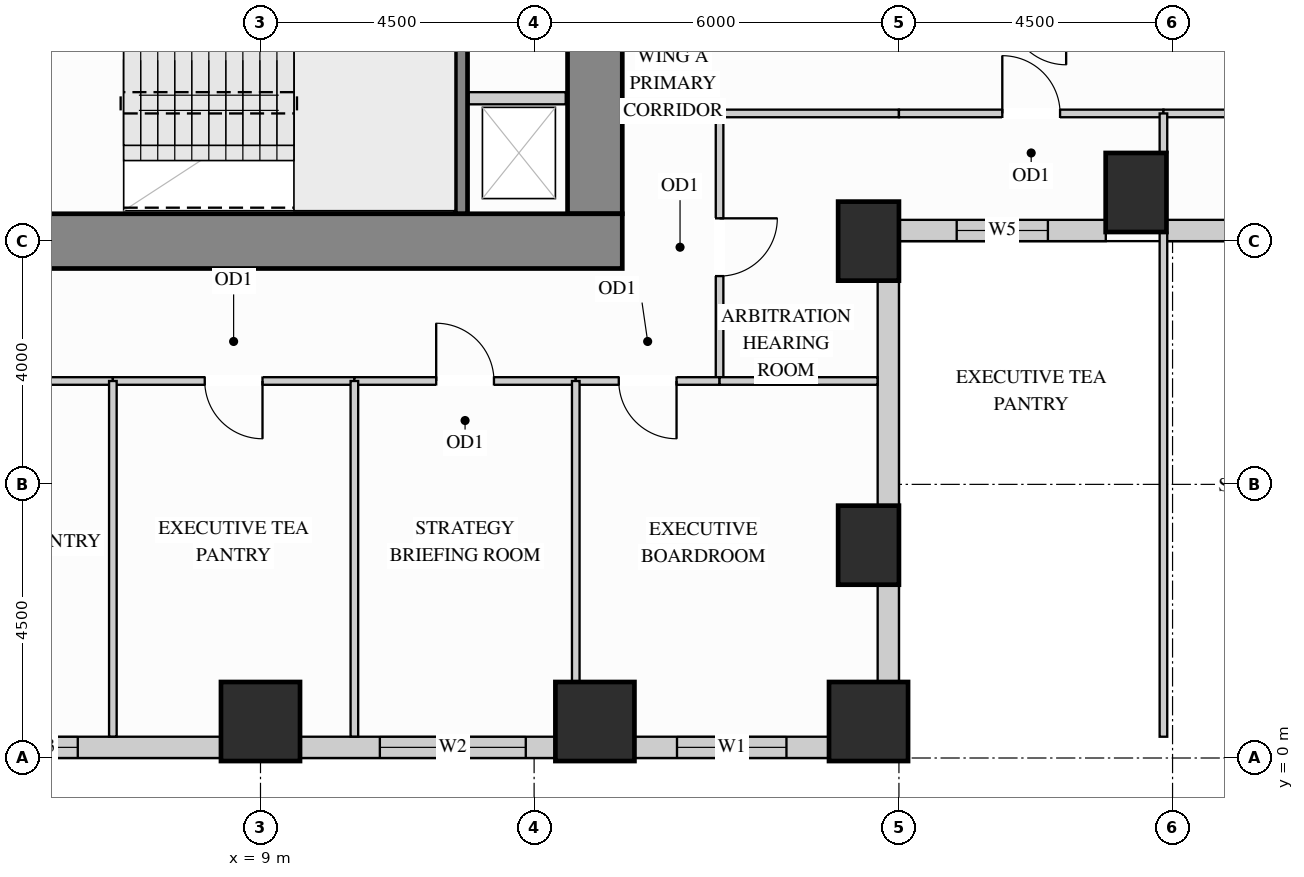
"""IFC4 building model, lengths in metres.
Left out: names, types, materials, properties, quantities, classifications, styles, units other than length and angle.
Written with IfcOpenShell. Run it as: python <this file> out.ifc"""

import sys

from ifc_helpers import new_model, si_unit, direction, frame, frame_2d, origin, origin_2d, place, context, subcontext, project, spatial, rectangle, extrude, source, transform, mapped, element, fill, save


model = new_model("IFC4")
c1 = context("Model", 3, precision=1e-05, world=origin(), true_north=direction((0.0, 1.0)))
c2 = subcontext(c1, "Body", "Model", "MODEL_VIEW")
j1 = project(units=[si_unit("LENGTHUNIT", "METRE"), si_unit("PLANEANGLEUNIT", "RADIAN")], contexts=[c1])
p1 = place(None, origin())
s1 = spatial("IfcSite", under=j1, at=p1, CompositionType="ELEMENT")
p2 = place(p1, origin())
s2 = spatial("IfcBuilding", under=s1, at=p2, CompositionType="ELEMENT")
p3 = place(p2, frame((0.0, 0.0, 29.7)))
s3 = spatial("IfcBuildingStorey", under=s2, at=p3, CompositionType="ELEMENT", Elevation=29.7)
m1 = source(origin(), c2, "Body", "SweptSolid", [
    extrude(rectangle(XDim=1.0, YDim=1.3, at=origin_2d()), origin(), (0.0, 0.0, 1.0), 3.38),
])
for number, where, z_axis, x_axis in (
    (1, (19.0, 3.5, 0.0), (0.0, 0.0, 1.0), (1.0, 0.0, 0.0)),
    (2, (19.0, 8.5, 0.0), (0.0, 0.0, 1.0), (1.0, 0.0, 0.0)),
    (3, (23.4, 9.3, 0.0), (0.0, 0.0, 1.0), (1.0, 0.0, 0.0)),
):
    element("IfcColumn", number, at=place(p3, frame(where, z_axis=z_axis, x_axis=x_axis)), inside=s3, PredefinedType="COLUMN", context=c2, shape_type="MappedRepresentation", body=[
        mapped(m1, transform((0.0, 0.0, 0.0), x_axis=(1.0, 0.0, 0.0), y_axis=(0.0, 1.0, 0.0), z_axis=(0.0, 0.0, 1.0))),
    ])
m2 = source(origin(), c2, "Body", "SweptSolid", [
    extrude(rectangle(XDim=1.3, YDim=1.3, at=origin_2d()), origin(), (0.0, 0.0, 1.0), 3.38),
])
for number, where, z_axis, x_axis in (
    (4, (14.5, 0.6, 0.0), (0.0, 0.0, 1.0), (1.0, 0.0, 0.0)),
    (5, (19.0, 0.6, 0.0), (0.0, 0.0, 1.0), (1.0, 0.0, 0.0)),
    (6, (9.0, 0.6, 0.0), (0.0, 0.0, 1.0), (1.0, 0.0, 0.0)),
):
    element("IfcColumn", number, at=place(p3, frame(where, z_axis=z_axis, x_axis=x_axis)), inside=s3, PredefinedType="COLUMN", context=c2, shape_type="MappedRepresentation", body=[
        mapped(m2, transform((0.0, 0.0, 0.0), x_axis=(1.0, 0.0, 0.0), y_axis=(0.0, 1.0, 0.0), z_axis=(0.0, 0.0, 1.0))),
    ])
m3 = source(origin(), c2, "Body", "SweptSolid", [
    extrude(rectangle(XDim=9.87, YDim=0.9, at=frame_2d((4.935, 0.0))), origin(), (0.0, 0.0, 1.0), 3.38),
])
p4 = place(p3, frame((14.5, 8.95, 0.0), z_axis=(0.0, 0.0, 1.0), x_axis=(0.0, 1.0, 0.0)))
e7 = element("IfcWall", 7, at=p4, inside=s3, PredefinedType="SHEAR", context=c2, shape_type="MappedRepresentation", body=[
    mapped(m3, transform((0.0, 0.0, 0.0), x_axis=(1.0, 0.0, 0.0), y_axis=(0.0, 1.0, 0.0), z_axis=(0.0, 0.0, 1.0))),
])
m4 = source(origin(), c2, "Body", "SweptSolid", [
    extrude(rectangle(XDim=10.9, YDim=0.9, at=frame_2d((5.45, 0.0))), origin(), (0.0, 0.0, 1.0), 3.38),
])
p5 = place(p3, frame((4.05, 8.5, 0.0), z_axis=(0.0, 0.0, 1.0), x_axis=(1.0, 0.0, 0.0)))
e8 = element("IfcWall", 8, at=p5, inside=s3, PredefinedType="SHEAR", context=c2, shape_type="MappedRepresentation", body=[
    mapped(m4, transform((0.0, 0.0, 0.0), x_axis=(1.0, 0.0, 0.0), y_axis=(0.0, 1.0, 0.0), z_axis=(0.0, 0.0, 1.0))),
])
p6 = place(p3, frame((4.148, 0.175, 0.0), z_axis=(0.0, 0.0, 1.0), x_axis=(1.0, 0.0, 0.0)))
e9 = element("IfcWall", 9, at=p6, inside=s3, PredefinedType="SOLIDWALL", context=c2, shape_type="SweptSolid", body=[
    extrude(rectangle(XDim=4.204, YDim=0.35, at=frame_2d((2.102, 0.0))), origin(), (0.0, 0.0, 1.0), 2.51),
])
p7 = place(p6, frame((0.647, 0.0, 0.78)))
e10 = element("IfcOpeningElement", 10, at=p7, cuts=e9, PredefinedType="OPENING", context=c2, shape_type="SweptSolid", body=[
    extrude(rectangle(XDim=1.2, YDim=1.55, at=frame_2d((0.6, 0.775))), frame((0.0, 0.185, 0.0), z_axis=(0.0, -1.0, 0.0), x_axis=(1.0, 0.0, 0.0)), (0.0, 0.0, 1.0), 0.37),
])
p8 = place(p3, frame((9.648, 0.175, 0.0), z_axis=(0.0, 0.0, 1.0), x_axis=(1.0, 0.0, 0.0)))
e11 = element("IfcWall", 11, at=p8, inside=s3, PredefinedType="SOLIDWALL", context=c2, shape_type="SweptSolid", body=[
    extrude(rectangle(XDim=4.204, YDim=0.35, at=frame_2d((2.102, 0.0))), origin(), (0.0, 0.0, 1.0), 2.51),
])
p9 = place(p8, frame((1.315, 0.0, 0.78)))
e12 = element("IfcOpeningElement", 12, at=p9, cuts=e11, PredefinedType="OPENING", context=c2, shape_type="SweptSolid", body=[
    extrude(rectangle(XDim=2.4, YDim=1.55, at=frame_2d((1.2, 0.775))), frame((0.0, 0.185, 0.0), z_axis=(0.0, -1.0, 0.0), x_axis=(1.0, 0.0, 0.0)), (0.0, 0.0, 1.0), 0.37),
])
p10 = place(p3, frame((15.148, 0.175, 0.0), z_axis=(0.0, 0.0, 1.0), x_axis=(1.0, 0.0, 0.0)))
e13 = element("IfcWall", 13, at=p10, inside=s3, PredefinedType="SOLIDWALL", context=c2, shape_type="SweptSolid", body=[
    extrude(rectangle(XDim=3.204, YDim=0.35, at=frame_2d((1.602, 0.0))), origin(), (0.0, 0.0, 1.0), 2.51),
])
p11 = place(p10, frame((0.702, 0.0, 0.78)))
e14 = element("IfcOpeningElement", 14, at=p11, cuts=e13, PredefinedType="OPENING", context=c2, shape_type="SweptSolid", body=[
    extrude(rectangle(XDim=1.8, YDim=1.55, at=frame_2d((0.9, 0.775))), frame((0.0, 0.185, 0.0), z_axis=(0.0, -1.0, 0.0), x_axis=(1.0, 0.0, 0.0)), (0.0, 0.0, 1.0), 0.37),
])
m5 = source(origin(), c2, "Body", "SweptSolid", [
    extrude(rectangle(XDim=1.604, YDim=0.35, at=frame_2d((0.802, 0.0))), origin(), (0.0, 0.0, 1.0), 2.51),
])
p12 = place(p3, frame((19.325, 1.248, 0.0), z_axis=(0.0, 0.0, 1.0), x_axis=(0.0, 1.0, 0.0)))
e15 = element("IfcWall", 15, at=p12, inside=s3, PredefinedType="SOLIDWALL", context=c2, shape_type="MappedRepresentation", body=[
    mapped(m5, transform((0.0, 0.0, 0.0), x_axis=(1.0, 0.0, 0.0), y_axis=(0.0, 1.0, 0.0), z_axis=(0.0, 0.0, 1.0))),
])
m6 = source(origin(), c2, "Body", "SweptSolid", [
    extrude(rectangle(XDim=3.704, YDim=0.35, at=frame_2d((1.852, 0.0))), origin(), (0.0, 0.0, 1.0), 2.51),
])
p13 = place(p3, frame((19.325, 4.148, 0.0), z_axis=(0.0, 0.0, 1.0), x_axis=(0.0, 1.0, 0.0)))
e16 = element("IfcWall", 16, at=p13, inside=s3, PredefinedType="SOLIDWALL", context=c2, shape_type="MappedRepresentation", body=[
    mapped(m6, transform((0.0, 0.0, 0.0), x_axis=(1.0, 0.0, 0.0), y_axis=(0.0, 1.0, 0.0), z_axis=(0.0, 0.0, 1.0))),
])
p14 = place(p3, frame((19.498, 8.675, 0.0), z_axis=(0.0, 0.0, 1.0), x_axis=(1.0, 0.0, 0.0)))
e17 = element("IfcWall", 17, at=p14, inside=s3, PredefinedType="SOLIDWALL", context=c2, shape_type="SweptSolid", body=[
    extrude(rectangle(XDim=3.404, YDim=0.35, at=frame_2d((1.702, 0.0))), origin(), (0.0, 0.0, 1.0), 3.365),
])
p15 = place(p14, frame((0.952, 0.0, 0.78)))
e18 = element("IfcOpeningElement", 18, at=p15, cuts=e17, PredefinedType="OPENING", context=c2, shape_type="SweptSolid", body=[
    extrude(rectangle(XDim=1.5, YDim=2.0, at=frame_2d((0.75, 1.0))), frame((0.0, 0.185, 0.0), z_axis=(0.0, -1.0, 0.0), x_axis=(1.0, 0.0, 0.0)), (0.0, 0.0, 1.0), 0.37),
])
p16 = place(p3, frame((23.898, 8.675, 0.0), z_axis=(0.0, 0.0, 1.0), x_axis=(1.0, 0.0, 0.0)))
e19 = element("IfcWall", 19, at=p16, inside=s3, PredefinedType="SOLIDWALL", context=c2, shape_type="SweptSolid", body=[
    extrude(rectangle(XDim=6.104, YDim=0.35, at=frame_2d((3.052, 0.0))), origin(), (0.0, 0.0, 1.0), 3.365),
])
p17 = place(p16, frame((1.114, 0.0, 0.78)))
e20 = element("IfcOpeningElement", 20, at=p17, cuts=e19, PredefinedType="OPENING", context=c2, shape_type="SweptSolid", body=[
    extrude(rectangle(XDim=1.5, YDim=2.0, at=frame_2d((0.75, 1.0))), frame((0.0, 0.185, 0.0), z_axis=(0.0, -1.0, 0.0), x_axis=(1.0, 0.0, 0.0)), (0.0, 0.0, 1.0), 0.37),
])
p18 = place(p16, frame((3.408, 0.0, 0.78)))
e21 = element("IfcOpeningElement", 21, at=p18, cuts=e19, PredefinedType="OPENING", context=c2, shape_type="SweptSolid", body=[
    extrude(rectangle(XDim=1.5, YDim=2.0, at=frame_2d((0.75, 1.0))), frame((0.0, 0.185, 0.0), z_axis=(0.0, -1.0, 0.0), x_axis=(1.0, 0.0, 0.0)), (0.0, 0.0, 1.0), 0.37),
])
p19 = place(p3, frame((16.55, 6.2, 0.0), z_axis=(0.0, 0.0, 1.0), x_axis=(0.0, 1.0, 0.0)))
e22 = element("IfcWall", 22, at=p19, inside=s3, PredefinedType="PARTITIONING", context=c2, shape_type="SweptSolid", body=[
    extrude(rectangle(XDim=4.4, YDim=0.125, at=frame_2d((2.2, 0.0))), origin(), (0.0, 0.0, 1.0), 3.365),
])
p20 = place(p19, frame((1.725, 0.0, 0.0)))
e23 = element("IfcOpeningElement", 23, at=p20, cuts=e22, PredefinedType="OPENING", context=c2, shape_type="SweptSolid", body=[
    extrude(rectangle(XDim=0.95, YDim=2.15, at=frame_2d((0.475, 1.075))), frame((0.0, 0.073, 0.0), z_axis=(0.0, -1.0, 0.0), x_axis=(1.0, 0.0, 0.0)), (0.0, 0.0, 1.0), 0.145),
])
m7 = source(origin(), c2, "Body", "SweptSolid", [
    extrude(rectangle(XDim=2.95, YDim=0.125, at=frame_2d((1.475, 0.0))), origin(), (0.0, 0.0, 1.0), 3.365),
])
p21 = place(p3, frame((16.55, 10.6, 0.0), z_axis=(0.0, 0.0, 1.0), x_axis=(1.0, 0.0, 0.0)))
e24 = element("IfcWall", 24, at=p21, inside=s3, PredefinedType="PARTITIONING", context=c2, shape_type="MappedRepresentation", body=[
    mapped(m7, transform((0.0, 0.0, 0.0), x_axis=(1.0, 0.0, 0.0), y_axis=(0.0, 1.0, 0.0), z_axis=(0.0, 0.0, 1.0))),
])
p22 = place(p3, frame((19.5, 10.6, 0.0), z_axis=(0.0, 0.0, 1.0), x_axis=(1.0, 0.0, 0.0)))
e25 = element("IfcWall", 25, at=p22, inside=s3, PredefinedType="PARTITIONING", context=c2, shape_type="SweptSolid", body=[
    extrude(rectangle(XDim=4.35, YDim=0.125, at=frame_2d((2.175, 0.0))), origin(), (0.0, 0.0, 1.0), 3.365),
])
p23 = place(p22, frame((1.7, 0.0, 0.0)))
e26 = element("IfcOpeningElement", 26, at=p23, cuts=e25, PredefinedType="OPENING", context=c2, shape_type="SweptSolid", body=[
    extrude(rectangle(XDim=0.95, YDim=2.15, at=frame_2d((0.475, 1.075))), frame((0.0, 0.073, 0.0), z_axis=(0.0, -1.0, 0.0), x_axis=(1.0, 0.0, 0.0)), (0.0, 0.0, 1.0), 0.145),
])
p24 = place(p3, frame((23.85, 10.6, 0.0), z_axis=(0.0, 0.0, 1.0), x_axis=(1.0, 0.0, 0.0)))
e27 = element("IfcWall", 27, at=p24, inside=s3, PredefinedType="PARTITIONING", context=c2, shape_type="SweptSolid", body=[
    extrude(rectangle(XDim=6.0, YDim=0.125, at=frame_2d((3.0, 0.0))), origin(), (0.0, 0.0, 1.0), 3.365),
])
p25 = place(p24, frame((2.525, 0.0, 0.0)))
e28 = element("IfcOpeningElement", 28, at=p25, cuts=e27, PredefinedType="OPENING", context=c2, shape_type="SweptSolid", body=[
    extrude(rectangle(XDim=0.95, YDim=2.15, at=frame_2d((0.475, 1.075))), frame((0.0, 0.073, 0.0), z_axis=(0.0, -1.0, 0.0), x_axis=(1.0, 0.0, 0.0)), (0.0, 0.0, 1.0), 0.145),
])
m8 = source(origin(), c2, "Body", "SweptSolid", [
    extrude(rectangle(XDim=8.29, YDim=0.125, at=frame_2d((4.145, 0.0))), origin(), (0.0, 0.0, 1.0), 3.365),
])
p26 = place(p3, frame((23.85, 0.35, 0.0), z_axis=(0.0, 0.0, 1.0), x_axis=(0.0, 1.0, 0.0)))
e29 = element("IfcWall", 29, at=p26, inside=s3, PredefinedType="PARTITIONING", context=c2, shape_type="MappedRepresentation", body=[
    mapped(m8, transform((0.0, 0.0, 0.0), x_axis=(1.0, 0.0, 0.0), y_axis=(0.0, 1.0, 0.0), z_axis=(0.0, 0.0, 1.0))),
])
m9 = source(origin(), c2, "Body", "SweptSolid", [
    extrude(rectangle(XDim=0.64, YDim=0.125, at=frame_2d((0.32, 0.0))), origin(), (0.0, 0.0, 1.0), 3.365),
])
p27 = place(p3, frame((23.85, 9.96, 0.0), z_axis=(0.0, 0.0, 1.0), x_axis=(0.0, 1.0, 0.0)))
e30 = element("IfcWall", 30, at=p27, inside=s3, PredefinedType="PARTITIONING", context=c2, shape_type="MappedRepresentation", body=[
    mapped(m9, transform((0.0, 0.0, 0.0), x_axis=(1.0, 0.0, 0.0), y_axis=(0.0, 1.0, 0.0), z_axis=(0.0, 0.0, 1.0))),
])
p28 = place(p3, frame((2.45, 6.2, 0.0), z_axis=(0.0, 0.0, 1.0), x_axis=(1.0, 0.0, 0.0)))
e31 = element("IfcWall", 31, at=p28, inside=s3, PredefinedType="PARTITIONING", context=c2, shape_type="SweptSolid", body=[
    extrude(rectangle(XDim=4.122, YDim=0.125, at=frame_2d((2.061, 0.0))), origin(), (0.0, 0.0, 1.0), 2.828),
])
p29 = place(p28, frame((1.586, 0.0, 0.0)))
e32 = element("IfcOpeningElement", 32, at=p29, cuts=e31, PredefinedType="OPENING", context=c2, shape_type="SweptSolid", body=[
    extrude(rectangle(XDim=0.95, YDim=2.15, at=frame_2d((0.475, 1.075))), frame((0.0, 0.073, 0.0), z_axis=(0.0, -1.0, 0.0), x_axis=(1.0, 0.0, 0.0)), (0.0, 0.0, 1.0), 0.145),
])
p30 = place(p3, frame((6.572, 6.2, 0.0), z_axis=(0.0, 0.0, 1.0), x_axis=(1.0, 0.0, 0.0)))
e33 = element("IfcWall", 33, at=p30, inside=s3, PredefinedType="PARTITIONING", context=c2, shape_type="SweptSolid", body=[
    extrude(rectangle(XDim=3.972, YDim=0.125, at=frame_2d((1.986, 0.0))), origin(), (0.0, 0.0, 1.0), 2.828),
])
p31 = place(p30, frame((1.511, 0.0, 0.0)))
e34 = element("IfcOpeningElement", 34, at=p31, cuts=e33, PredefinedType="OPENING", context=c2, shape_type="SweptSolid", body=[
    extrude(rectangle(XDim=0.95, YDim=2.15, at=frame_2d((0.475, 1.075))), frame((0.0, 0.073, 0.0), z_axis=(0.0, -1.0, 0.0), x_axis=(1.0, 0.0, 0.0)), (0.0, 0.0, 1.0), 0.145),
])
p32 = place(p3, frame((10.544, 6.2, 0.0), z_axis=(0.0, 0.0, 1.0), x_axis=(1.0, 0.0, 0.0)))
e35 = element("IfcWall", 35, at=p32, inside=s3, PredefinedType="PARTITIONING", context=c2, shape_type="SweptSolid", body=[
    extrude(rectangle(XDim=3.641, YDim=0.125, at=frame_2d((1.821, 0.0))), origin(), (0.0, 0.0, 1.0), 2.828),
])
p33 = place(p32, frame((1.345, 0.0, 0.0)))
e36 = element("IfcOpeningElement", 36, at=p33, cuts=e35, PredefinedType="OPENING", context=c2, shape_type="SweptSolid", body=[
    extrude(rectangle(XDim=0.95, YDim=2.15, at=frame_2d((0.475, 1.075))), frame((0.0, 0.073, 0.0), z_axis=(0.0, -1.0, 0.0), x_axis=(1.0, 0.0, 0.0)), (0.0, 0.0, 1.0), 0.145),
])
p34 = place(p3, frame((14.185, 6.2, 0.0), z_axis=(0.0, 0.0, 1.0), x_axis=(1.0, 0.0, 0.0)))
e37 = element("IfcWall", 37, at=p34, inside=s3, PredefinedType="PARTITIONING", context=c2, shape_type="SweptSolid", body=[
    extrude(rectangle(XDim=2.365, YDim=0.125, at=frame_2d((1.183, 0.0))), origin(), (0.0, 0.0, 1.0), 2.828),
])
p35 = place(p34, frame((0.708, 0.0, 0.0)))
e38 = element("IfcOpeningElement", 38, at=p35, cuts=e37, PredefinedType="OPENING", context=c2, shape_type="SweptSolid", body=[
    extrude(rectangle(XDim=0.95, YDim=2.15, at=frame_2d((0.475, 1.075))), frame((0.0, 0.073, 0.0), z_axis=(0.0, -1.0, 0.0), x_axis=(1.0, 0.0, 0.0)), (0.0, 0.0, 1.0), 0.145),
])
m10 = source(origin(), c2, "Body", "SweptSolid", [
    extrude(rectangle(XDim=2.598, YDim=0.125, at=frame_2d((1.299, 0.0))), origin(), (0.0, 0.0, 1.0), 2.828),
])
p36 = place(p3, frame((16.55, 6.2, 0.0), z_axis=(0.0, 0.0, 1.0), x_axis=(1.0, 0.0, 0.0)))
e39 = element("IfcWall", 39, at=p36, inside=s3, PredefinedType="PARTITIONING", context=c2, shape_type="MappedRepresentation", body=[
    mapped(m10, transform((0.0, 0.0, 0.0), x_axis=(1.0, 0.0, 0.0), y_axis=(0.0, 1.0, 0.0), z_axis=(0.0, 0.0, 1.0))),
])
m11 = source(origin(), c2, "Body", "SweptSolid", [
    extrude(rectangle(XDim=5.848, YDim=0.125, at=frame_2d((2.924, 0.0))), origin(), (0.0, 0.0, 1.0), 3.365),
])
for number, where, z_axis, x_axis in (
    (40, (6.572, 0.352, 0.0), (0.0, 0.0, 1.0), (0.0, 1.0, 0.0)),
    (41, (10.544, 0.352, 0.0), (0.0, 0.0, 1.0), (0.0, 1.0, 0.0)),
):
    element("IfcWall", number, at=place(p3, frame(where, z_axis=z_axis, x_axis=x_axis)), inside=s3, PredefinedType="PARTITIONING", context=c2, shape_type="MappedRepresentation", body=[
        mapped(m11, transform((0.0, 0.0, 0.0), x_axis=(1.0, 0.0, 0.0), y_axis=(0.0, 1.0, 0.0), z_axis=(0.0, 0.0, 1.0))),
    ])
m12 = source(origin(), c2, "Body", "SweptSolid", [
    extrude(rectangle(XDim=4.94, YDim=0.125, at=frame_2d((2.47, 0.0))), origin(), (0.0, 0.0, 1.0), 3.365),
])
p37 = place(p3, frame((14.185, 1.26, 0.0), z_axis=(0.0, 0.0, 1.0), x_axis=(0.0, 1.0, 0.0)))
e42 = element("IfcWall", 42, at=p37, inside=s3, PredefinedType="PARTITIONING", context=c2, shape_type="MappedRepresentation", body=[
    mapped(m12, transform((0.0, 0.0, 0.0), x_axis=(1.0, 0.0, 0.0), y_axis=(0.0, 1.0, 0.0), z_axis=(0.0, 0.0, 1.0))),
])
m13 = source(origin(), c2, "Body", "SweptSolid", [
    extrude(rectangle(XDim=1.6, YDim=0.2, at=frame_2d((0.8, 0.0))), origin(), (0.0, 0.0, 1.0), 3.365),
])
p38 = place(p3, frame((12.42, 10.85, 0.0), z_axis=(0.0, 0.0, 1.0), x_axis=(1.0, 0.0, 0.0)))
e43 = element("IfcWall", 43, at=p38, inside=s3, PredefinedType="PARTITIONING", context=c2, shape_type="MappedRepresentation", body=[
    mapped(m13, transform((0.0, 0.0, 0.0), x_axis=(1.0, 0.0, 0.0), y_axis=(0.0, 1.0, 0.0), z_axis=(0.0, 0.0, 1.0))),
])
m14 = source(origin(), c2, "Body", "SweptSolid", [
    extrude(rectangle(XDim=3.603, YDim=0.2, at=frame_2d((1.802, 0.0))), origin(), (0.0, 0.0, 1.0), 3.38),
])
p39 = place(p3, frame((12.305, 8.952, 0.0), z_axis=(0.0, 0.0, 1.0), x_axis=(0.0, 1.0, 0.0)))
e44 = element("IfcWall", 44, at=p39, inside=s3, PredefinedType="SHEAR", context=c2, shape_type="MappedRepresentation", body=[
    mapped(m14, transform((0.0, 0.0, 0.0), x_axis=(1.0, 0.0, 0.0), y_axis=(0.0, 1.0, 0.0), z_axis=(0.0, 0.0, 1.0))),
])
m15 = source(origin(), c2, "Body", "SweptSolid", [
    extrude(rectangle(XDim=0.95, YDim=2.15, at=frame_2d((0.475, 1.075))), frame((0.0, 0.025, 0.0), z_axis=(0.0, -1.0, 0.0), x_axis=(1.0, 0.0, 0.0)), (0.0, 0.0, 1.0), 0.05),
])
p40 = place(p20, origin())
e45 = element("IfcDoor", 45, at=p40, inside=s3, OperationType="SINGLE_SWING_RIGHT", PredefinedType="DOOR", context=c2, shape_type="MappedRepresentation", body=[
    mapped(m15, transform((0.0, 0.0, 0.0), x_axis=(1.0, 0.0, 0.0), y_axis=(0.0, 1.0, 0.0), z_axis=(0.0, 0.0, 1.0))),
])
fill(e23, e45)
p41 = place(p31, origin())
e46 = element("IfcDoor", 46, at=p41, inside=s3, OperationType="SINGLE_SWING_RIGHT", PredefinedType="DOOR", context=c2, shape_type="MappedRepresentation", body=[
    mapped(m15, transform((0.0, 0.0, 0.0), x_axis=(1.0, 0.0, 0.0), y_axis=(0.0, 1.0, 0.0), z_axis=(0.0, 0.0, 1.0))),
])
fill(e34, e46)
p42 = place(p33, origin())
e47 = element("IfcDoor", 47, at=p42, inside=s3, OperationType="SINGLE_SWING_LEFT", PredefinedType="DOOR", context=c2, shape_type="MappedRepresentation", body=[
    mapped(m15, transform((0.0, 0.0, 0.0), x_axis=(1.0, 0.0, 0.0), y_axis=(0.0, 1.0, 0.0), z_axis=(0.0, 0.0, 1.0))),
])
fill(e36, e47)
p43 = place(p35, origin())
e48 = element("IfcDoor", 48, at=p43, inside=s3, OperationType="SINGLE_SWING_RIGHT", PredefinedType="DOOR", context=c2, shape_type="MappedRepresentation", body=[
    mapped(m15, transform((0.0, 0.0, 0.0), x_axis=(1.0, 0.0, 0.0), y_axis=(0.0, 1.0, 0.0), z_axis=(0.0, 0.0, 1.0))),
])
fill(e38, e48)
p44 = place(p23, origin())
e49 = element("IfcDoor", 49, at=p44, inside=s3, OperationType="SINGLE_SWING_LEFT", PredefinedType="DOOR", context=c2, shape_type="MappedRepresentation", body=[
    mapped(m15, transform((0.0, 0.0, 0.0), x_axis=(1.0, 0.0, 0.0), y_axis=(0.0, 1.0, 0.0), z_axis=(0.0, 0.0, 1.0))),
])
fill(e26, e49)
m16 = source(origin(), c2, "Body", "SweptSolid", [
    extrude(rectangle(XDim=1.8, YDim=1.55, at=frame_2d((0.9, 0.775))), frame((0.0, 0.03, 0.0), z_axis=(0.0, -1.0, 0.0), x_axis=(1.0, 0.0, 0.0)), (0.0, 0.0, 1.0), 0.06),
])
p45 = place(p11, origin())
e50 = element("IfcWindow", 50, at=p45, inside=s3, PartitioningType="SINGLE_PANEL", PredefinedType="WINDOW", context=c2, shape_type="MappedRepresentation", body=[
    mapped(m16, transform((0.0, 0.0, 0.0), x_axis=(1.0, 0.0, 0.0), y_axis=(0.0, 1.0, 0.0), z_axis=(0.0, 0.0, 1.0))),
])
fill(e14, e50)
m17 = source(origin(), c2, "Body", "SweptSolid", [
    extrude(rectangle(XDim=2.4, YDim=1.55, at=frame_2d((1.2, 0.775))), frame((0.0, 0.03, 0.0), z_axis=(0.0, -1.0, 0.0), x_axis=(1.0, 0.0, 0.0)), (0.0, 0.0, 1.0), 0.06),
])
p46 = place(p9, origin())
e51 = element("IfcWindow", 51, at=p46, inside=s3, PartitioningType="SINGLE_PANEL", PredefinedType="WINDOW", context=c2, shape_type="MappedRepresentation", body=[
    mapped(m17, transform((0.0, 0.0, 0.0), x_axis=(1.0, 0.0, 0.0), y_axis=(0.0, 1.0, 0.0), z_axis=(0.0, 0.0, 1.0))),
])
fill(e12, e51)
m18 = source(origin(), c2, "Body", "SweptSolid", [
    extrude(rectangle(XDim=1.2, YDim=1.55, at=frame_2d((0.6, 0.775))), frame((0.0, 0.03, 0.0), z_axis=(0.0, -1.0, 0.0), x_axis=(1.0, 0.0, 0.0)), (0.0, 0.0, 1.0), 0.06),
])
p47 = place(p7, origin())
e52 = element("IfcWindow", 52, at=p47, inside=s3, PartitioningType="SINGLE_PANEL", PredefinedType="WINDOW", context=c2, shape_type="MappedRepresentation", body=[
    mapped(m18, transform((0.0, 0.0, 0.0), x_axis=(1.0, 0.0, 0.0), y_axis=(0.0, 1.0, 0.0), z_axis=(0.0, 0.0, 1.0))),
])
fill(e10, e52)
m19 = source(origin(), c2, "Body", "SweptSolid", [
    extrude(rectangle(XDim=1.5, YDim=2.0, at=frame_2d((0.75, 1.0))), frame((0.0, 0.03, 0.0), z_axis=(0.0, -1.0, 0.0), x_axis=(1.0, 0.0, 0.0)), (0.0, 0.0, 1.0), 0.06),
])
p48 = place(p15, origin())
e53 = element("IfcWindow", 53, at=p48, inside=s3, PartitioningType="SINGLE_PANEL", PredefinedType="WINDOW", context=c2, shape_type="MappedRepresentation", body=[
    mapped(m19, transform((0.0, 0.0, 0.0), x_axis=(1.0, 0.0, 0.0), y_axis=(0.0, 1.0, 0.0), z_axis=(0.0, 0.0, 1.0))),
])
fill(e18, e53)
save(model, sys.argv[1])
